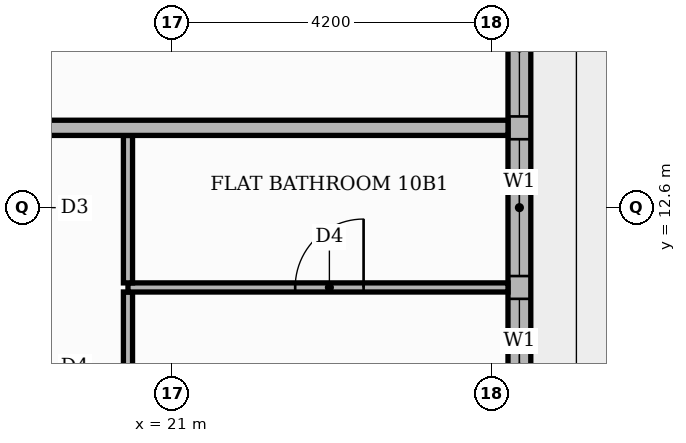
"""IFC4 building model, lengths in metres.
Left out: names, types, materials, properties, quantities, classifications, styles, units other than length and angle.
Written with IfcOpenShell. Run it as: python <this file> out.ifc"""

import sys

from ifc_helpers import new_model, si_unit, direction, frame, frame_2d, origin, place, context, subcontext, project, spatial, rectangle, extrude, element, fill, save


model = new_model("IFC4")
c1 = context("Model", 3, precision=1e-05, world=origin(), true_north=direction((0.0, 1.0)))
c2 = subcontext(c1, "Body", "Model", "MODEL_VIEW")
j1 = project(units=[si_unit("LENGTHUNIT", "METRE"), si_unit("PLANEANGLEUNIT", "RADIAN")], contexts=[c1])
p1 = place(None, origin())
s1 = spatial("IfcSite", under=j1, at=p1, CompositionType="ELEMENT")
p2 = place(p1, origin())
s2 = spatial("IfcBuilding", under=s1, at=p2, CompositionType="ELEMENT")
p3 = place(p2, frame((0.0, 0.0, 46.5)))
s3 = spatial("IfcBuildingStorey", under=s2, at=p3, CompositionType="ELEMENT", Elevation=46.5)
p4 = place(p3, frame((25.57, 9.0, 0.0), z_axis=(0.0, 0.0, 1.0), x_axis=(0.0, 1.0, 0.0)))
e1 = element("IfcWall", 1, at=p4, inside=s3, PredefinedType="STANDARD", context=c2, shape_type="SweptSolid", body=[
    extrude(rectangle(XDim=7.2, YDim=0.3, at=frame_2d((3.6, 0.0))), origin(), (0.0, 0.0, 1.0), 3.48),
])
p5 = place(p4, frame((0.6, 0.0, 0.9)))
e2 = element("IfcOpeningElement", 2, at=p5, cuts=e1, PredefinedType="OPENING", context=c2, shape_type="SweptSolid", body=[
    extrude(rectangle(XDim=1.8, YDim=2.1, at=frame_2d((0.9, 1.05))), frame((0.0, 0.16, 0.0), z_axis=(0.0, -1.0, 0.0), x_axis=(1.0, 0.0, 0.0)), (0.0, 0.0, 1.0), 0.32),
])
p6 = place(p4, frame((2.7, 0.0, 0.9)))
e3 = element("IfcOpeningElement", 3, at=p6, cuts=e1, PredefinedType="OPENING", context=c2, shape_type="SweptSolid", body=[
    extrude(rectangle(XDim=1.8, YDim=2.1, at=frame_2d((0.9, 1.05))), frame((0.0, 0.16, 0.0), z_axis=(0.0, -1.0, 0.0), x_axis=(1.0, 0.0, 0.0)), (0.0, 0.0, 1.0), 0.32),
])
p7 = place(p4, frame((4.8, 0.0, 0.9)))
e4 = element("IfcOpeningElement", 4, at=p7, cuts=e1, PredefinedType="OPENING", context=c2, shape_type="SweptSolid", body=[
    extrude(rectangle(XDim=1.8, YDim=2.1, at=frame_2d((0.9, 1.05))), frame((0.0, 0.16, 0.0), z_axis=(0.0, -1.0, 0.0), x_axis=(1.0, 0.0, 0.0)), (0.0, 0.0, 1.0), 0.32),
])
p8 = place(p3, frame((20.42, 7.41, 0.0), z_axis=(0.0, 0.0, 1.0), x_axis=(0.0, 1.0, 0.0)))
e5 = element("IfcWall", 5, at=p8, inside=s3, PredefinedType="PARTITIONING", context=c2, shape_type="SweptSolid", body=[
    extrude(rectangle(XDim=4.08, YDim=0.12, at=frame_2d((2.04, 0.0))), origin(), (0.0, 0.0, 1.0), 3.48),
])
p9 = place(p8, frame((1.59, 0.0, 0.0)))
e6 = element("IfcOpeningElement", 6, at=p9, cuts=e5, PredefinedType="OPENING", context=c2, shape_type="SweptSolid", body=[
    extrude(rectangle(XDim=0.9, YDim=2.1, at=frame_2d((0.45, 1.05))), frame((0.0, 0.07, 0.0), z_axis=(0.0, -1.0, 0.0), x_axis=(1.0, 0.0, 0.0)), (0.0, 0.0, 1.0), 0.14),
])
p10 = place(p3, frame((20.42, 11.55, 0.0), z_axis=(0.0, 0.0, 1.0), x_axis=(1.0, 0.0, 0.0)))
e7 = element("IfcWall", 7, at=p10, inside=s3, PredefinedType="PARTITIONING", context=c2, shape_type="SweptSolid", body=[
    extrude(rectangle(XDim=5.0, YDim=0.12, at=frame_2d((2.5, 0.0))), origin(), (0.0, 0.0, 1.0), 3.48),
])
p11 = place(p10, frame((2.2, 0.0, 0.0)))
e8 = element("IfcOpeningElement", 8, at=p11, cuts=e7, PredefinedType="OPENING", context=c2, shape_type="SweptSolid", body=[
    extrude(rectangle(XDim=0.9, YDim=2.1, at=frame_2d((0.45, 1.05))), frame((0.0, 0.07, 0.0), z_axis=(0.0, -1.0, 0.0), x_axis=(1.0, 0.0, 0.0)), (0.0, 0.0, 1.0), 0.14),
])
p12 = place(p3, frame((20.42, 11.61, 0.0), z_axis=(0.0, 0.0, 1.0), x_axis=(0.0, 1.0, 0.0)))
e9 = element("IfcWall", 9, at=p12, inside=s3, PredefinedType="PARTITIONING", context=c2, shape_type="SweptSolid", body=[
    extrude(rectangle(XDim=1.94, YDim=0.12, at=frame_2d((0.97, 0.0))), origin(), (0.0, 0.0, 1.0), 3.48),
])
p13 = place(p3, frame((-13.65, 13.65, 0.0), z_axis=(0.0, 0.0, 1.0), x_axis=(1.0, 0.0, 0.0)))
e10 = element("IfcWall", 10, at=p13, inside=s3, PredefinedType="PARTITIONING", context=c2, shape_type="SweptSolid", body=[
    extrude(rectangle(XDim=39.07, YDim=0.2, at=frame_2d((19.535, 0.0))), origin(), (0.0, 0.0, 1.0), 3.48),
])
p14 = place(p13, frame((24.65, 0.0, 0.0)))
e11 = element("IfcOpeningElement", 11, at=p14, cuts=e10, PredefinedType="OPENING", context=c2, shape_type="SweptSolid", body=[
    extrude(rectangle(XDim=1.1, YDim=2.4, at=frame_2d((0.55, 1.2))), frame((0.0, 0.11, 0.0), z_axis=(0.0, -1.0, 0.0), x_axis=(1.0, 0.0, 0.0)), (0.0, 0.0, 1.0), 0.22),
])
p15 = place(p13, frame((14.15, 0.0, 0.0)))
e12 = element("IfcOpeningElement", 12, at=p15, cuts=e10, PredefinedType="OPENING", context=c2, shape_type="SweptSolid", body=[
    extrude(rectangle(XDim=1.1, YDim=2.4, at=frame_2d((0.55, 1.2))), frame((0.0, 0.11, 0.0), z_axis=(0.0, -1.0, 0.0), x_axis=(1.0, 0.0, 0.0)), (0.0, 0.0, 1.0), 0.22),
])
p16 = place(p5, origin())
e13 = element("IfcWindow", 13, at=p16, inside=s3, PartitioningType="SINGLE_PANEL", PredefinedType="WINDOW", context=c2, shape_type="SweptSolid", body=[
    extrude(rectangle(XDim=1.8, YDim=2.1, at=frame_2d((0.9, 1.05))), frame((0.0, 0.03, 0.0), z_axis=(0.0, -1.0, 0.0), x_axis=(1.0, 0.0, 0.0)), (0.0, 0.0, 1.0), 0.06),
])
fill(e2, e13)
p17 = place(p6, origin())
e14 = element("IfcWindow", 14, at=p17, inside=s3, PartitioningType="SINGLE_PANEL", PredefinedType="WINDOW", context=c2, shape_type="SweptSolid", body=[
    extrude(rectangle(XDim=1.8, YDim=2.1, at=frame_2d((0.9, 1.05))), frame((0.0, 0.03, 0.0), z_axis=(0.0, -1.0, 0.0), x_axis=(1.0, 0.0, 0.0)), (0.0, 0.0, 1.0), 0.06),
])
fill(e3, e14)
p18 = place(p7, origin())
e15 = element("IfcWindow", 15, at=p18, inside=s3, PartitioningType="SINGLE_PANEL", PredefinedType="WINDOW", context=c2, shape_type="SweptSolid", body=[
    extrude(rectangle(XDim=1.8, YDim=2.1, at=frame_2d((0.9, 1.05))), frame((0.0, 0.03, 0.0), z_axis=(0.0, -1.0, 0.0), x_axis=(1.0, 0.0, 0.0)), (0.0, 0.0, 1.0), 0.06),
])
fill(e4, e15)
p19 = place(p11, origin())
e16 = element("IfcDoor", 16, at=p19, inside=s3, OperationType="SINGLE_SWING_RIGHT", PredefinedType="DOOR", context=c2, shape_type="SweptSolid", body=[
    extrude(rectangle(XDim=0.9, YDim=2.1, at=frame_2d((0.45, 1.05))), frame((0.0, 0.025, 0.0), z_axis=(0.0, -1.0, 0.0), x_axis=(1.0, 0.0, 0.0)), (0.0, 0.0, 1.0), 0.05),
])
fill(e8, e16)
save(model, sys.argv[1])
